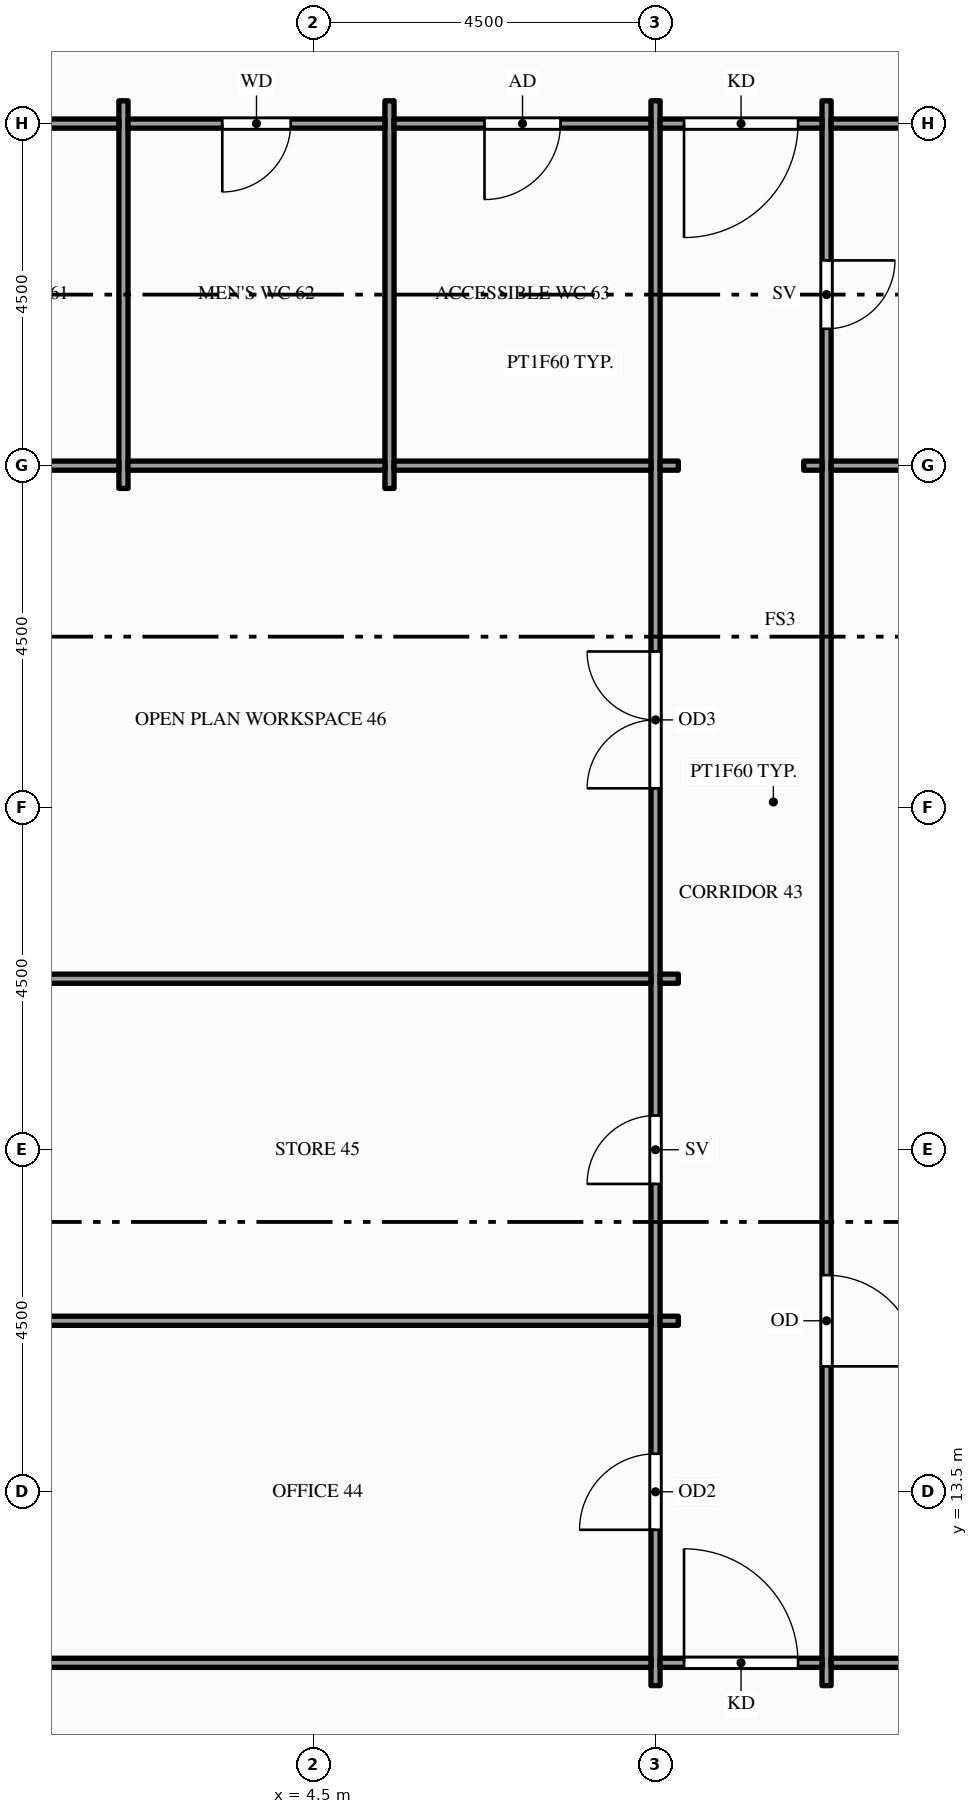
"""IFC4 building model, lengths in metres.
Left out: names, types, materials, properties, quantities, classifications, styles, units other than length and angle.
Written with IfcOpenShell. Run it as: python <this file> out.ifc"""

import sys

from ifc_helpers import new_model, si_unit, direction, frame, frame_2d, origin, place, context, subcontext, project, spatial, rectangle, extrude, element, fill, save


model = new_model("IFC4")
c1 = context("Model", 3, precision=1e-05, world=origin(), true_north=direction((0.0, 1.0)))
c2 = subcontext(c1, "Body", "Model", "MODEL_VIEW")
j1 = project(units=[si_unit("LENGTHUNIT", "METRE"), si_unit("PLANEANGLEUNIT", "RADIAN")], contexts=[c1])
p1 = place(None, origin())
s1 = spatial("IfcSite", under=j1, at=p1, CompositionType="ELEMENT")
p2 = place(p1, origin())
s2 = spatial("IfcBuilding", under=s1, at=p2, CompositionType="ELEMENT")
p3 = place(p2, frame((0.0, 0.0, 33.0)))
s3 = spatial("IfcBuildingStorey", under=s2, at=p3, CompositionType="ELEMENT", Elevation=33.0)
for number, where, z_axis, x_axis in (
    (1, (2.0, 26.7, 0.0), (0.0, 0.0, 1.0), (0.0, 1.0, 0.0)),
    (2, (5.5, 26.7, 0.0), (0.0, 0.0, 1.0), (0.0, 1.0, 0.0)),
):
    element("IfcWall", number, at=place(p3, frame(where, z_axis=z_axis, x_axis=x_axis)), inside=s3, PredefinedType="PARTITIONING", context=c2, shape_type="SweptSolid", body=[
        extrude(rectangle(XDim=5.1, YDim=0.12, at=frame_2d((2.55, 0.0))), origin(), (0.0, 0.0, 1.0), 3.85),
    ])
p4 = place(p3, frame((9.0, 10.95, 0.0), z_axis=(0.0, 0.0, 1.0), x_axis=(0.0, 1.0, 0.0)))
e3 = element("IfcWall", 3, at=p4, inside=s3, PredefinedType="PARTITIONING", context=c2, shape_type="SweptSolid", body=[
    extrude(rectangle(XDim=20.85, YDim=0.12, at=frame_2d((10.425, 0.0))), origin(), (0.0, 0.0, 1.0), 2.6),
])
p5 = place(p4, frame((2.05, 0.0, 0.0)))
e4 = element("IfcOpeningElement", 4, at=p5, cuts=e3, PredefinedType="OPENING", context=c2, shape_type="SweptSolid", body=[
    extrude(rectangle(XDim=1.0, YDim=2.1, at=frame_2d((0.5, 1.05))), frame((0.0, 0.07, 0.0), z_axis=(0.0, -1.0, 0.0), x_axis=(1.0, 0.0, 0.0)), (0.0, 0.0, 1.0), 0.14),
])
p6 = place(p4, frame((6.6, 0.0, 0.0)))
e5 = element("IfcOpeningElement", 5, at=p6, cuts=e3, PredefinedType="OPENING", context=c2, shape_type="SweptSolid", body=[
    extrude(rectangle(XDim=0.9, YDim=2.1, at=frame_2d((0.45, 1.05))), frame((0.0, 0.07, 0.0), z_axis=(0.0, -1.0, 0.0), x_axis=(1.0, 0.0, 0.0)), (0.0, 0.0, 1.0), 0.14),
])
p7 = place(p4, frame((11.805, 0.0, 0.0)))
e6 = element("IfcOpeningElement", 6, at=p7, cuts=e3, PredefinedType="OPENING", context=c2, shape_type="SweptSolid", body=[
    extrude(rectangle(XDim=1.8, YDim=2.1, at=frame_2d((0.9, 1.05))), frame((0.0, 0.07, 0.0), z_axis=(0.0, -1.0, 0.0), x_axis=(1.0, 0.0, 0.0)), (0.0, 0.0, 1.0), 0.14),
])
p8 = place(p3, frame((11.25, 10.95, 0.0), z_axis=(0.0, 0.0, 1.0), x_axis=(0.0, 1.0, 0.0)))
e7 = element("IfcWall", 7, at=p8, inside=s3, PredefinedType="PARTITIONING", context=c2, shape_type="SweptSolid", body=[
    extrude(rectangle(XDim=20.85, YDim=0.12, at=frame_2d((10.425, 0.0))), origin(), (0.0, 0.0, 1.0), 2.6),
])
p9 = place(p8, frame((17.85, 0.0, 0.0)))
e8 = element("IfcOpeningElement", 8, at=p9, cuts=e7, PredefinedType="OPENING", context=c2, shape_type="SweptSolid", body=[
    extrude(rectangle(XDim=0.9, YDim=2.1, at=frame_2d((0.45, 1.05))), frame((0.0, 0.07, 0.0), z_axis=(0.0, -1.0, 0.0), x_axis=(1.0, 0.0, 0.0)), (0.0, 0.0, 1.0), 0.14),
])
p10 = place(p8, frame((4.2, 0.0, 0.0)))
e9 = element("IfcOpeningElement", 9, at=p10, cuts=e7, PredefinedType="OPENING", context=c2, shape_type="SweptSolid", body=[
    extrude(rectangle(XDim=1.2, YDim=2.1, at=frame_2d((0.6, 1.05))), frame((0.0, 0.07, 0.0), z_axis=(0.0, -1.0, 0.0), x_axis=(1.0, 0.0, 0.0)), (0.0, 0.0, 1.0), 0.14),
])
p11 = place(p3, frame((0.15, 11.25, 0.0), z_axis=(0.0, 0.0, 1.0), x_axis=(1.0, 0.0, 0.0)))
e10 = element("IfcWall", 10, at=p11, inside=s3, PredefinedType="PARTITIONING", context=c2, shape_type="SweptSolid", body=[
    extrude(rectangle(XDim=8.79, YDim=0.12, at=frame_2d((4.395, 0.0))), origin(), (0.0, 0.0, 1.0), 2.938),
])
p12 = place(p3, frame((9.06, 11.25, 0.0), z_axis=(0.0, 0.0, 1.0), x_axis=(1.0, 0.0, 0.0)))
e11 = element("IfcWall", 11, at=p12, inside=s3, PredefinedType="PARTITIONING", context=c2, shape_type="SweptSolid", body=[
    extrude(rectangle(XDim=2.13, YDim=0.12, at=frame_2d((1.065, 0.0))), origin(), (0.0, 0.0, 1.0), 2.938),
])
p13 = place(p12, frame((0.315, 0.0, 0.0)))
e12 = element("IfcOpeningElement", 12, at=p13, cuts=e11, PredefinedType="OPENING", context=c2, shape_type="SweptSolid", body=[
    extrude(rectangle(XDim=1.5, YDim=2.1, at=frame_2d((0.75, 1.05))), frame((0.0, 0.07, 0.0), z_axis=(0.0, -1.0, 0.0), x_axis=(1.0, 0.0, 0.0)), (0.0, 0.0, 1.0), 0.14),
])
p14 = place(p3, frame((11.31, 11.25, 0.0), z_axis=(0.0, 0.0, 1.0), x_axis=(1.0, 0.0, 0.0)))
e13 = element("IfcWall", 13, at=p14, inside=s3, PredefinedType="PARTITIONING", context=c2, shape_type="SweptSolid", body=[
    extrude(rectangle(XDim=15.63, YDim=0.12, at=frame_2d((7.815, 0.0))), origin(), (0.0, 0.0, 1.0), 2.938),
])
p15 = place(p14, frame((3.54, 0.0, 0.0)))
e14 = element("IfcOpeningElement", 14, at=p15, cuts=e13, PredefinedType="OPENING", context=c2, shape_type="SweptSolid", body=[
    extrude(rectangle(XDim=1.8, YDim=2.1, at=frame_2d((0.9, 1.05))), frame((0.0, 0.07, 0.0), z_axis=(0.0, -1.0, 0.0), x_axis=(1.0, 0.0, 0.0)), (0.0, 0.0, 1.0), 0.14),
])
p16 = place(p3, frame((0.15, 15.75, 0.0), z_axis=(0.0, 0.0, 1.0), x_axis=(1.0, 0.0, 0.0)))
e15 = element("IfcWall", 15, at=p16, inside=s3, PredefinedType="PARTITIONING", context=c2, shape_type="SweptSolid", body=[
    extrude(rectangle(XDim=8.79, YDim=0.12, at=frame_2d((4.395, 0.0))), origin(), (0.0, 0.0, 1.0), 2.938),
])
p17 = place(p3, frame((9.06, 15.75, 0.0), z_axis=(0.0, 0.0, 1.0), x_axis=(1.0, 0.0, 0.0)))
e16 = element("IfcWall", 16, at=p17, inside=s3, PredefinedType="PARTITIONING", context=c2, shape_type="SweptSolid", body=[
    extrude(rectangle(XDim=0.24, YDim=0.12, at=frame_2d((0.12, 0.0))), origin(), (0.0, 0.0, 1.0), 2.938),
])
p18 = place(p3, frame((0.15, 20.25, 0.0), z_axis=(0.0, 0.0, 1.0), x_axis=(1.0, 0.0, 0.0)))
e17 = element("IfcWall", 17, at=p18, inside=s3, PredefinedType="PARTITIONING", context=c2, shape_type="SweptSolid", body=[
    extrude(rectangle(XDim=8.79, YDim=0.12, at=frame_2d((4.395, 0.0))), origin(), (0.0, 0.0, 1.0), 2.938),
])
p19 = place(p3, frame((9.06, 20.25, 0.0), z_axis=(0.0, 0.0, 1.0), x_axis=(1.0, 0.0, 0.0)))
e18 = element("IfcWall", 18, at=p19, inside=s3, PredefinedType="PARTITIONING", context=c2, shape_type="SweptSolid", body=[
    extrude(rectangle(XDim=0.24, YDim=0.12, at=frame_2d((0.12, 0.0))), origin(), (0.0, 0.0, 1.0), 2.938),
])
p20 = place(p3, frame((-1.35, 27.0, 0.0), z_axis=(0.0, 0.0, 1.0), x_axis=(1.0, 0.0, 0.0)))
e19 = element("IfcWall", 19, at=p20, inside=s3, PredefinedType="PARTITIONING", context=c2, shape_type="SweptSolid", body=[
    extrude(rectangle(XDim=3.29, YDim=0.12, at=frame_2d((1.645, 0.0))), origin(), (0.0, 0.0, 1.0), 2.938),
])
for number, where, z_axis, x_axis in (
    (20, (2.06, 27.0, 0.0), (0.0, 0.0, 1.0), (1.0, 0.0, 0.0)),
    (21, (5.56, 27.0, 0.0), (0.0, 0.0, 1.0), (1.0, 0.0, 0.0)),
):
    element("IfcWall", number, at=place(p3, frame(where, z_axis=z_axis, x_axis=x_axis)), inside=s3, PredefinedType="PARTITIONING", context=c2, shape_type="SweptSolid", body=[
        extrude(rectangle(XDim=3.38, YDim=0.12, at=frame_2d((1.69, 0.0))), origin(), (0.0, 0.0, 1.0), 2.938),
    ])
for number, where, z_axis, x_axis in (
    (22, (9.06, 27.0, 0.0), (0.0, 0.0, 1.0), (1.0, 0.0, 0.0)),
    (23, (10.95, 27.0, 0.0), (0.0, 0.0, 1.0), (1.0, 0.0, 0.0)),
):
    element("IfcWall", number, at=place(p3, frame(where, z_axis=z_axis, x_axis=x_axis)), inside=s3, PredefinedType="PARTITIONING", context=c2, shape_type="SweptSolid", body=[
        extrude(rectangle(XDim=0.24, YDim=0.12, at=frame_2d((0.12, 0.0))), origin(), (0.0, 0.0, 1.0), 2.938),
    ])
p21 = place(p3, frame((11.31, 27.0, 0.0), z_axis=(0.0, 0.0, 1.0), x_axis=(1.0, 0.0, 0.0)))
e24 = element("IfcWall", 24, at=p21, inside=s3, PredefinedType="PARTITIONING", context=c2, shape_type="SweptSolid", body=[
    extrude(rectangle(XDim=9.82, YDim=0.12, at=frame_2d((4.91, 0.0))), origin(), (0.0, 0.0, 1.0), 2.938),
])
p22 = place(p3, frame((-1.35, 31.5, 0.0), z_axis=(0.0, 0.0, 1.0), x_axis=(1.0, 0.0, 0.0)))
e25 = element("IfcWall", 25, at=p22, inside=s3, PredefinedType="PARTITIONING", context=c2, shape_type="SweptSolid", body=[
    extrude(rectangle(XDim=3.29, YDim=0.12, at=frame_2d((1.645, 0.0))), origin(), (0.0, 0.0, 1.0), 2.938),
])
p23 = place(p22, frame((0.85, 0.0, 0.0)))
e26 = element("IfcOpeningElement", 26, at=p23, cuts=e25, PredefinedType="OPENING", context=c2, shape_type="SweptSolid", body=[
    extrude(rectangle(XDim=0.9, YDim=2.1, at=frame_2d((0.45, 1.05))), frame((0.0, 0.07, 0.0), z_axis=(0.0, -1.0, 0.0), x_axis=(1.0, 0.0, 0.0)), (0.0, 0.0, 1.0), 0.14),
])
p24 = place(p3, frame((2.06, 31.5, 0.0), z_axis=(0.0, 0.0, 1.0), x_axis=(1.0, 0.0, 0.0)))
e27 = element("IfcWall", 27, at=p24, inside=s3, PredefinedType="PARTITIONING", context=c2, shape_type="SweptSolid", body=[
    extrude(rectangle(XDim=3.38, YDim=0.12, at=frame_2d((1.69, 0.0))), origin(), (0.0, 0.0, 1.0), 2.938),
])
p25 = place(p24, frame((1.24, 0.0, 0.0)))
e28 = element("IfcOpeningElement", 28, at=p25, cuts=e27, PredefinedType="OPENING", context=c2, shape_type="SweptSolid", body=[
    extrude(rectangle(XDim=0.9, YDim=2.1, at=frame_2d((0.45, 1.05))), frame((0.0, 0.07, 0.0), z_axis=(0.0, -1.0, 0.0), x_axis=(1.0, 0.0, 0.0)), (0.0, 0.0, 1.0), 0.14),
])
p26 = place(p3, frame((5.56, 31.5, 0.0), z_axis=(0.0, 0.0, 1.0), x_axis=(1.0, 0.0, 0.0)))
e29 = element("IfcWall", 29, at=p26, inside=s3, PredefinedType="PARTITIONING", context=c2, shape_type="SweptSolid", body=[
    extrude(rectangle(XDim=3.38, YDim=0.12, at=frame_2d((1.69, 0.0))), origin(), (0.0, 0.0, 1.0), 2.938),
])
p27 = place(p26, frame((1.19, 0.0, 0.0)))
e30 = element("IfcOpeningElement", 30, at=p27, cuts=e29, PredefinedType="OPENING", context=c2, shape_type="SweptSolid", body=[
    extrude(rectangle(XDim=1.0, YDim=2.1, at=frame_2d((0.5, 1.05))), frame((0.0, 0.07, 0.0), z_axis=(0.0, -1.0, 0.0), x_axis=(1.0, 0.0, 0.0)), (0.0, 0.0, 1.0), 0.14),
])
p28 = place(p3, frame((9.06, 31.5, 0.0), z_axis=(0.0, 0.0, 1.0), x_axis=(1.0, 0.0, 0.0)))
e31 = element("IfcWall", 31, at=p28, inside=s3, PredefinedType="PARTITIONING", context=c2, shape_type="SweptSolid", body=[
    extrude(rectangle(XDim=2.13, YDim=0.12, at=frame_2d((1.065, 0.0))), origin(), (0.0, 0.0, 1.0), 2.938),
])
p29 = place(p28, frame((0.315, 0.0, 0.0)))
e32 = element("IfcOpeningElement", 32, at=p29, cuts=e31, PredefinedType="OPENING", context=c2, shape_type="SweptSolid", body=[
    extrude(rectangle(XDim=1.5, YDim=2.1, at=frame_2d((0.75, 1.05))), frame((0.0, 0.07, 0.0), z_axis=(0.0, -1.0, 0.0), x_axis=(1.0, 0.0, 0.0)), (0.0, 0.0, 1.0), 0.14),
])
p30 = place(p3, frame((11.31, 31.5, 0.0), z_axis=(0.0, 0.0, 1.0), x_axis=(1.0, 0.0, 0.0)))
e33 = element("IfcWall", 33, at=p30, inside=s3, PredefinedType="PARTITIONING", context=c2, shape_type="SweptSolid", body=[
    extrude(rectangle(XDim=9.54, YDim=0.12, at=frame_2d((4.77, 0.0))), origin(), (0.0, 0.0, 1.0), 2.938),
])
p31 = place(p13, origin())
e34 = element("IfcDoor", 34, at=p31, inside=s3, OperationType="SINGLE_SWING_LEFT", PredefinedType="DOOR", context=c2, shape_type="SweptSolid", body=[
    extrude(rectangle(XDim=1.5, YDim=2.1, at=frame_2d((0.75, 1.05))), frame((0.0, 0.025, 0.0), z_axis=(0.0, -1.0, 0.0), x_axis=(1.0, 0.0, 0.0)), (0.0, 0.0, 1.0), 0.05),
])
fill(e12, e34)
p32 = place(p29, origin())
e35 = element("IfcDoor", 35, at=p32, inside=s3, OperationType="SINGLE_SWING_LEFT", PredefinedType="DOOR", context=c2, shape_type="SweptSolid", body=[
    extrude(rectangle(XDim=1.5, YDim=2.1, at=frame_2d((0.75, 1.05))), frame((0.0, 0.025, 0.0), z_axis=(0.0, -1.0, 0.0), x_axis=(1.0, 0.0, 0.0)), (0.0, 0.0, 1.0), 0.05),
])
fill(e32, e35)
p33 = place(p5, origin())
e36 = element("IfcDoor", 36, at=p33, inside=s3, OperationType="SINGLE_SWING_LEFT", PredefinedType="DOOR", context=c2, shape_type="SweptSolid", body=[
    extrude(rectangle(XDim=1.0, YDim=2.1, at=frame_2d((0.5, 1.05))), frame((0.0, 0.025, 0.0), z_axis=(0.0, -1.0, 0.0), x_axis=(1.0, 0.0, 0.0)), (0.0, 0.0, 1.0), 0.05),
])
fill(e4, e36)
p34 = place(p6, origin())
e37 = element("IfcDoor", 37, at=p34, inside=s3, OperationType="SINGLE_SWING_LEFT", PredefinedType="DOOR", context=c2, shape_type="SweptSolid", body=[
    extrude(rectangle(XDim=0.9, YDim=2.1, at=frame_2d((0.45, 1.05))), frame((0.0, 0.025, 0.0), z_axis=(0.0, -1.0, 0.0), x_axis=(1.0, 0.0, 0.0)), (0.0, 0.0, 1.0), 0.05),
])
fill(e5, e37)
p35 = place(p7, origin())
e38 = element("IfcDoor", 38, at=p35, inside=s3, OperationType="DOUBLE_DOOR_SINGLE_SWING", PredefinedType="DOOR", context=c2, shape_type="SweptSolid", body=[
    extrude(rectangle(XDim=1.8, YDim=2.1, at=frame_2d((0.9, 1.05))), frame((0.0, 0.025, 0.0), z_axis=(0.0, -1.0, 0.0), x_axis=(1.0, 0.0, 0.0)), (0.0, 0.0, 1.0), 0.05),
])
fill(e6, e38)
p36 = place(p25, origin())
e39 = element("IfcDoor", 39, at=p36, inside=s3, OperationType="SINGLE_SWING_LEFT", PredefinedType="DOOR", context=c2, shape_type="SweptSolid", body=[
    extrude(rectangle(XDim=0.9, YDim=2.1, at=frame_2d((0.45, 1.05))), frame((0.0, 0.025, 0.0), z_axis=(0.0, -1.0, 0.0), x_axis=(1.0, 0.0, 0.0)), (0.0, 0.0, 1.0), 0.05),
])
fill(e28, e39)
p37 = place(p27, origin())
e40 = element("IfcDoor", 40, at=p37, inside=s3, OperationType="SINGLE_SWING_LEFT", PredefinedType="DOOR", context=c2, shape_type="SweptSolid", body=[
    extrude(rectangle(XDim=1.0, YDim=2.1, at=frame_2d((0.5, 1.05))), frame((0.0, 0.025, 0.0), z_axis=(0.0, -1.0, 0.0), x_axis=(1.0, 0.0, 0.0)), (0.0, 0.0, 1.0), 0.05),
])
fill(e30, e40)
p38 = place(p9, origin())
e41 = element("IfcDoor", 41, at=p38, inside=s3, OperationType="SINGLE_SWING_RIGHT", PredefinedType="DOOR", context=c2, shape_type="SweptSolid", body=[
    extrude(rectangle(XDim=0.9, YDim=2.1, at=frame_2d((0.45, 1.05))), frame((0.0, 0.025, 0.0), z_axis=(0.0, -1.0, 0.0), x_axis=(1.0, 0.0, 0.0)), (0.0, 0.0, 1.0), 0.05),
])
fill(e8, e41)
p39 = place(p10, origin())
e42 = element("IfcDoor", 42, at=p39, inside=s3, OperationType="SINGLE_SWING_LEFT", PredefinedType="DOOR", context=c2, shape_type="SweptSolid", body=[
    extrude(rectangle(XDim=1.2, YDim=2.1, at=frame_2d((0.6, 1.05))), frame((0.0, 0.025, 0.0), z_axis=(0.0, -1.0, 0.0), x_axis=(1.0, 0.0, 0.0)), (0.0, 0.0, 1.0), 0.05),
])
fill(e9, e42)
save(model, sys.argv[1])
